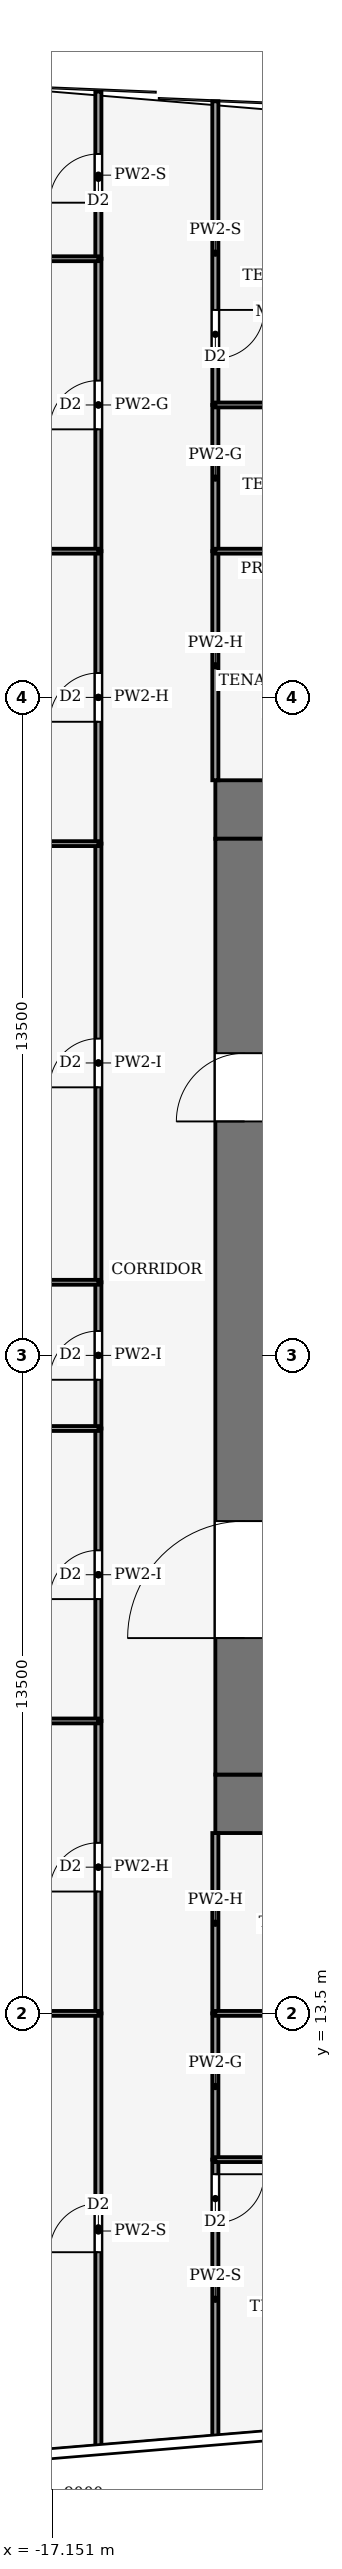
"""IFC4 building model, lengths in metres.
Left out: names, types, materials, properties, quantities, classifications, styles, units other than length and angle.
Written with IfcOpenShell. Run it as: python <this file> out.ifc"""

import sys

from ifc_helpers import new_model, si_unit, direction, frame, frame_2d, origin, place, context, subcontext, project, spatial, rectangle, extrude, element, fill, save


model = new_model("IFC4")
c1 = context("Model", 3, precision=1e-05, world=origin(), true_north=direction((0.0, 1.0)))
c2 = subcontext(c1, "Body", "Model", "MODEL_VIEW")
j1 = project(units=[si_unit("LENGTHUNIT", "METRE"), si_unit("PLANEANGLEUNIT", "RADIAN")], contexts=[c1])
p1 = place(None, origin())
s1 = spatial("IfcSite", under=j1, at=p1, CompositionType="ELEMENT")
p2 = place(p1, origin())
s2 = spatial("IfcBuilding", under=s1, at=p2, CompositionType="ELEMENT")
p3 = place(p2, frame((0.0, 0.0, 70.0)))
s3 = spatial("IfcBuildingStorey", under=s2, at=p3, CompositionType="ELEMENT", Elevation=70.0)
for number, where, z_axis, x_axis in (
    (1, (-13.8, 17.8, -0.13), (0.0, 0.0, 1.0), (1.0, 0.0, 0.0)),
    (2, (-13.8, 38.2, -0.13), (0.0, 0.0, 1.0), (1.0, 0.0, 0.0)),
):
    element("IfcWall", number, at=place(p3, frame(where, z_axis=z_axis, x_axis=x_axis)), inside=s3, PredefinedType="SHEAR", context=c2, shape_type="SweptSolid", body=[
        extrude(rectangle(XDim=27.6, YDim=1.2, at=frame_2d((13.8, 0.0))), origin(), (0.0, 0.0, 1.0), 4.0),
    ])
p4 = place(p3, frame((-13.2, 18.4, -0.13), z_axis=(0.0, 0.0, 1.0), x_axis=(0.0, 1.0, 0.0)))
e3 = element("IfcWall", 3, at=p4, inside=s3, PredefinedType="SHEAR", context=c2, shape_type="SweptSolid", body=[
    extrude(rectangle(XDim=19.2, YDim=1.2, at=frame_2d((9.6, 0.0))), origin(), (0.0, 0.0, 1.0), 4.0),
])
p5 = place(p4, frame((2.8, 0.0, 0.13)))
e4 = element("IfcOpeningElement", 4, at=p5, cuts=e3, PredefinedType="OPENING", context=c2, shape_type="SweptSolid", body=[
    extrude(rectangle(XDim=2.4, YDim=2.4, at=frame_2d((1.2, 1.2))), frame((0.0, 0.61, 0.0), z_axis=(0.0, -1.0, 0.0), x_axis=(1.0, 0.0, 0.0)), (0.0, 0.0, 1.0), 1.22),
])
p6 = place(p4, frame((13.4, 0.0, 0.13)))
e5 = element("IfcOpeningElement", 5, at=p6, cuts=e3, PredefinedType="OPENING", context=c2, shape_type="SweptSolid", body=[
    extrude(rectangle(XDim=1.4, YDim=2.2, at=frame_2d((0.7, 1.1))), frame((0.0, 0.61, 0.0), z_axis=(0.0, -1.0, 0.0), x_axis=(1.0, 0.0, 0.0)), (0.0, 0.0, 1.0), 1.22),
])
p7 = place(p3, frame((-16.2, 4.57, 0.0), z_axis=(0.0, 0.0, 1.0), x_axis=(0.0, 1.0, 0.0)))
e6 = element("IfcWall", 6, at=p7, inside=s3, PredefinedType="PARTITIONING", context=c2, shape_type="SweptSolid", body=[
    extrude(rectangle(XDim=8.93, YDim=0.125, at=frame_2d((4.465, 0.0))), origin(), (0.0, 0.0, 1.0), 3.04),
])
p8 = place(p7, frame((4.03, 0.0, 0.0)))
e7 = element("IfcOpeningElement", 7, at=p8, cuts=e6, PredefinedType="OPENING", context=c2, shape_type="SweptSolid", body=[
    extrude(rectangle(XDim=1.0, YDim=2.1, at=frame_2d((0.5, 1.05))), frame((0.0, 0.073, 0.0), z_axis=(0.0, -1.0, 0.0), x_axis=(1.0, 0.0, 0.0)), (0.0, 0.0, 1.0), 0.145),
])
p9 = place(p3, frame((-16.2, 13.5, 0.0), z_axis=(0.0, 0.0, 1.0), x_axis=(0.0, 1.0, 0.0)))
e8 = element("IfcWall", 8, at=p9, inside=s3, PredefinedType="PARTITIONING", context=c2, shape_type="SweptSolid", body=[
    extrude(rectangle(XDim=6.0, YDim=0.125, at=frame_2d((3.0, 0.0))), origin(), (0.0, 0.0, 1.0), 3.14),
])
p10 = place(p9, frame((2.5, 0.0, 0.0)))
e9 = element("IfcOpeningElement", 9, at=p10, cuts=e8, PredefinedType="OPENING", context=c2, shape_type="SweptSolid", body=[
    extrude(rectangle(XDim=1.0, YDim=2.1, at=frame_2d((0.5, 1.05))), frame((0.0, 0.073, 0.0), z_axis=(0.0, -1.0, 0.0), x_axis=(1.0, 0.0, 0.0)), (0.0, 0.0, 1.0), 0.145),
])
p11 = place(p3, frame((-16.2, 19.5, 0.0), z_axis=(0.0, 0.0, 1.0), x_axis=(0.0, 1.0, 0.0)))
e10 = element("IfcWall", 10, at=p11, inside=s3, PredefinedType="PARTITIONING", context=c2, shape_type="SweptSolid", body=[
    extrude(rectangle(XDim=6.0, YDim=0.125, at=frame_2d((3.0, 0.0))), origin(), (0.0, 0.0, 1.0), 3.48),
])
p12 = place(p11, frame((2.5, 0.0, 0.0)))
e11 = element("IfcOpeningElement", 11, at=p12, cuts=e10, PredefinedType="OPENING", context=c2, shape_type="SweptSolid", body=[
    extrude(rectangle(XDim=1.0, YDim=2.1, at=frame_2d((0.5, 1.05))), frame((0.0, 0.073, 0.0), z_axis=(0.0, -1.0, 0.0), x_axis=(1.0, 0.0, 0.0)), (0.0, 0.0, 1.0), 0.145),
])
p13 = place(p3, frame((-16.2, 25.5, 0.0), z_axis=(0.0, 0.0, 1.0), x_axis=(0.0, 1.0, 0.0)))
e12 = element("IfcWall", 12, at=p13, inside=s3, PredefinedType="PARTITIONING", context=c2, shape_type="SweptSolid", body=[
    extrude(rectangle(XDim=3.0, YDim=0.125, at=frame_2d((1.5, 0.0))), origin(), (0.0, 0.0, 1.0), 3.48),
])
p14 = place(p13, frame((1.0, 0.0, 0.0)))
e13 = element("IfcOpeningElement", 13, at=p14, cuts=e12, PredefinedType="OPENING", context=c2, shape_type="SweptSolid", body=[
    extrude(rectangle(XDim=1.0, YDim=2.1, at=frame_2d((0.5, 1.05))), frame((0.0, 0.073, 0.0), z_axis=(0.0, -1.0, 0.0), x_axis=(1.0, 0.0, 0.0)), (0.0, 0.0, 1.0), 0.145),
])
p15 = place(p3, frame((-16.2, 28.5, 0.0), z_axis=(0.0, 0.0, 1.0), x_axis=(0.0, 1.0, 0.0)))
e14 = element("IfcWall", 14, at=p15, inside=s3, PredefinedType="PARTITIONING", context=c2, shape_type="SweptSolid", body=[
    extrude(rectangle(XDim=9.0, YDim=0.125, at=frame_2d((4.5, 0.0))), origin(), (0.0, 0.0, 1.0), 3.48),
])
p16 = place(p15, frame((4.0, 0.0, 0.0)))
e15 = element("IfcOpeningElement", 15, at=p16, cuts=e14, PredefinedType="OPENING", context=c2, shape_type="SweptSolid", body=[
    extrude(rectangle(XDim=1.0, YDim=2.1, at=frame_2d((0.5, 1.05))), frame((0.0, 0.073, 0.0), z_axis=(0.0, -1.0, 0.0), x_axis=(1.0, 0.0, 0.0)), (0.0, 0.0, 1.0), 0.145),
])
p17 = place(p3, frame((-16.2, 37.5, 0.0), z_axis=(0.0, 0.0, 1.0), x_axis=(0.0, 1.0, 0.0)))
e16 = element("IfcWall", 16, at=p17, inside=s3, PredefinedType="PARTITIONING", context=c2, shape_type="SweptSolid", body=[
    extrude(rectangle(XDim=6.0, YDim=0.125, at=frame_2d((3.0, 0.0))), origin(), (0.0, 0.0, 1.0), 3.14),
])
p18 = place(p17, frame((2.5, 0.0, 0.0)))
e17 = element("IfcOpeningElement", 17, at=p18, cuts=e16, PredefinedType="OPENING", context=c2, shape_type="SweptSolid", body=[
    extrude(rectangle(XDim=1.0, YDim=2.1, at=frame_2d((0.5, 1.05))), frame((0.0, 0.073, 0.0), z_axis=(0.0, -1.0, 0.0), x_axis=(1.0, 0.0, 0.0)), (0.0, 0.0, 1.0), 0.145),
])
p19 = place(p3, frame((-16.2, 43.5, 0.0), z_axis=(0.0, 0.0, 1.0), x_axis=(0.0, 1.0, 0.0)))
e18 = element("IfcWall", 18, at=p19, inside=s3, PredefinedType="PARTITIONING", context=c2, shape_type="SweptSolid", body=[
    extrude(rectangle(XDim=6.0, YDim=0.125, at=frame_2d((3.0, 0.0))), origin(), (0.0, 0.0, 1.0), 3.87),
])
p20 = place(p19, frame((2.5, 0.0, 0.0)))
e19 = element("IfcOpeningElement", 19, at=p20, cuts=e18, PredefinedType="OPENING", context=c2, shape_type="SweptSolid", body=[
    extrude(rectangle(XDim=1.0, YDim=2.1, at=frame_2d((0.5, 1.05))), frame((0.0, 0.073, 0.0), z_axis=(0.0, -1.0, 0.0), x_axis=(1.0, 0.0, 0.0)), (0.0, 0.0, 1.0), 0.145),
])
p21 = place(p3, frame((-16.2, 49.5, 0.0), z_axis=(0.0, 0.0, 1.0), x_axis=(0.0, 1.0, 0.0)))
e20 = element("IfcWall", 20, at=p21, inside=s3, PredefinedType="PARTITIONING", context=c2, shape_type="SweptSolid", body=[
    extrude(rectangle(XDim=3.43, YDim=0.125, at=frame_2d((1.715, 0.0))), origin(), (0.0, 0.0, 1.0), 3.04),
])
p22 = place(p21, frame((1.15, 0.0, 0.0)))
e21 = element("IfcOpeningElement", 21, at=p22, cuts=e20, PredefinedType="OPENING", context=c2, shape_type="SweptSolid", body=[
    extrude(rectangle(XDim=1.0, YDim=2.1, at=frame_2d((0.5, 1.05))), frame((0.0, 0.073, 0.0), z_axis=(0.0, -1.0, 0.0), x_axis=(1.0, 0.0, 0.0)), (0.0, 0.0, 1.0), 0.145),
])
p23 = place(p3, frame((-13.8, 10.5, 0.0), z_axis=(0.0, 0.0, 1.0), x_axis=(0.0, -1.0, 0.0)))
e22 = element("IfcWall", 22, at=p23, inside=s3, PredefinedType="PARTITIONING", context=c2, shape_type="SweptSolid", body=[
    extrude(rectangle(XDim=5.73, YDim=0.125, at=frame_2d((2.865, 0.0))), origin(), (0.0, 0.0, 1.0), 3.04),
])
p24 = place(p23, frame((0.3, 0.0, 0.0)))
e23 = element("IfcOpeningElement", 23, at=p24, cuts=e22, PredefinedType="OPENING", context=c2, shape_type="SweptSolid", body=[
    extrude(rectangle(XDim=1.0, YDim=2.1, at=frame_2d((0.5, 1.05))), frame((0.0, 0.073, 0.0), z_axis=(0.0, -1.0, 0.0), x_axis=(1.0, 0.0, 0.0)), (0.0, 0.0, 1.0), 0.145),
])
p25 = place(p3, frame((-13.8, 10.5, 0.0), z_axis=(0.0, 0.0, 1.0), x_axis=(0.0, 1.0, 0.0)))
e24 = element("IfcWall", 24, at=p25, inside=s3, PredefinedType="PARTITIONING", context=c2, shape_type="SweptSolid", body=[
    extrude(rectangle(XDim=3.0, YDim=0.125, at=frame_2d((1.5, 0.0))), origin(), (0.0, 0.0, 1.0), 3.87),
])
p26 = place(p3, frame((-13.8, 13.5, 0.0), z_axis=(0.0, 0.0, 1.0), x_axis=(0.0, 1.0, 0.0)))
e25 = element("IfcWall", 25, at=p26, inside=s3, PredefinedType="PARTITIONING", context=c2, shape_type="SweptSolid", body=[
    extrude(rectangle(XDim=3.7, YDim=0.125, at=frame_2d((1.85, 0.0))), origin(), (0.0, 0.0, 1.0), 3.14),
])
p27 = place(p3, frame((-13.8, 38.8, 0.0), z_axis=(0.0, 0.0, 1.0), x_axis=(0.0, 1.0, 0.0)))
e26 = element("IfcWall", 26, at=p27, inside=s3, PredefinedType="PARTITIONING", context=c2, shape_type="SweptSolid", body=[
    extrude(rectangle(XDim=4.7, YDim=0.125, at=frame_2d((2.35, 0.0))), origin(), (0.0, 0.0, 1.0), 3.14),
])
p28 = place(p3, frame((-13.8, 43.5, 0.0), z_axis=(0.0, 0.0, 1.0), x_axis=(0.0, 1.0, 0.0)))
e27 = element("IfcWall", 27, at=p28, inside=s3, PredefinedType="PARTITIONING", context=c2, shape_type="SweptSolid", body=[
    extrude(rectangle(XDim=3.0, YDim=0.125, at=frame_2d((1.5, 0.0))), origin(), (0.0, 0.0, 1.0), 3.87),
])
p29 = place(p3, frame((-13.8, 52.73, 0.0), z_axis=(0.0, 0.0, 1.0), x_axis=(0.0, -1.0, 0.0)))
e28 = element("IfcWall", 28, at=p29, inside=s3, PredefinedType="PARTITIONING", context=c2, shape_type="SweptSolid", body=[
    extrude(rectangle(XDim=6.23, YDim=0.125, at=frame_2d((3.115, 0.0))), origin(), (0.0, 0.0, 1.0), 3.04),
])
p30 = place(p29, frame((4.28, 0.0, 0.0)))
e29 = element("IfcOpeningElement", 29, at=p30, cuts=e28, PredefinedType="OPENING", context=c2, shape_type="SweptSolid", body=[
    extrude(rectangle(XDim=1.0, YDim=2.1, at=frame_2d((0.5, 1.05))), frame((0.0, 0.073, 0.0), z_axis=(0.0, -1.0, 0.0), x_axis=(1.0, 0.0, 0.0)), (0.0, 0.0, 1.0), 0.145),
])
p31 = place(p3, frame((-16.2, 13.5, 0.0), z_axis=(0.0, 0.0, 1.0), x_axis=(-1.0, 0.0, 0.0)))
e30 = element("IfcWall", 30, at=p31, inside=s3, PredefinedType="PARTITIONING", context=c2, shape_type="SweptSolid", body=[
    extrude(rectangle(XDim=7.634, YDim=0.1, at=frame_2d((3.817, 0.0))), origin(), (0.0, 0.0, 1.0), 3.04),
])
p32 = place(p3, frame((-16.2, 19.5, 0.0), z_axis=(0.0, 0.0, 1.0), x_axis=(-1.0, 0.0, 0.0)))
e31 = element("IfcWall", 31, at=p32, inside=s3, PredefinedType="PARTITIONING", context=c2, shape_type="SweptSolid", body=[
    extrude(rectangle(XDim=7.14, YDim=0.1, at=frame_2d((3.57, 0.0))), origin(), (0.0, 0.0, 1.0), 3.04),
])
p33 = place(p3, frame((-16.2, 25.5, 0.0), z_axis=(0.0, 0.0, 1.0), x_axis=(-1.0, 0.0, 0.0)))
e32 = element("IfcWall", 32, at=p33, inside=s3, PredefinedType="PARTITIONING", context=c2, shape_type="SweptSolid", body=[
    extrude(rectangle(XDim=6.647, YDim=0.1, at=frame_2d((3.324, 0.0))), origin(), (0.0, 0.0, 1.0), 3.04),
])
p34 = place(p3, frame((-16.2, 28.5, 0.0), z_axis=(0.0, 0.0, 1.0), x_axis=(-1.0, 0.0, 0.0)))
e33 = element("IfcWall", 33, at=p34, inside=s3, PredefinedType="PARTITIONING", context=c2, shape_type="SweptSolid", body=[
    extrude(rectangle(XDim=6.401, YDim=0.1, at=frame_2d((3.2, 0.0))), origin(), (0.0, 0.0, 1.0), 3.04),
])
p35 = place(p3, frame((-16.2, 37.5, 0.0), z_axis=(0.0, 0.0, 1.0), x_axis=(-1.0, 0.0, 0.0)))
e34 = element("IfcWall", 34, at=p35, inside=s3, PredefinedType="PARTITIONING", context=c2, shape_type="SweptSolid", body=[
    extrude(rectangle(XDim=7.099, YDim=0.1, at=frame_2d((3.55, 0.0))), origin(), (0.0, 0.0, 1.0), 3.04),
])
p36 = place(p3, frame((-16.2, 43.5, 0.0), z_axis=(0.0, 0.0, 1.0), x_axis=(-1.0, 0.0, 0.0)))
e35 = element("IfcWall", 35, at=p36, inside=s3, PredefinedType="PARTITIONING", context=c2, shape_type="SweptSolid", body=[
    extrude(rectangle(XDim=7.592, YDim=0.1, at=frame_2d((3.796, 0.0))), origin(), (0.0, 0.0, 1.0), 3.04),
])
p37 = place(p3, frame((-16.2, 49.5, 0.0), z_axis=(0.0, 0.0, 1.0), x_axis=(-1.0, 0.0, 0.0)))
e36 = element("IfcWall", 36, at=p37, inside=s3, PredefinedType="PARTITIONING", context=c2, shape_type="SweptSolid", body=[
    extrude(rectangle(XDim=7.287, YDim=0.1, at=frame_2d((3.644, 0.0))), origin(), (0.0, 0.0, 1.0), 3.34),
])
p38 = place(p3, frame((-13.8, 10.5, 0.0), z_axis=(0.0, 0.0, 1.0), x_axis=(1.0, 0.0, 0.0)))
e37 = element("IfcWall", 37, at=p38, inside=s3, PredefinedType="PARTITIONING", context=c2, shape_type="SweptSolid", body=[
    extrude(rectangle(XDim=6.3, YDim=0.1, at=frame_2d((3.15, 0.0))), origin(), (0.0, 0.0, 1.0), 3.39),
])
p39 = place(p38, frame((2.65, 0.0, 0.0)))
e38 = element("IfcOpeningElement", 38, at=p39, cuts=e37, PredefinedType="OPENING", context=c2, shape_type="SweptSolid", body=[
    extrude(rectangle(XDim=1.0, YDim=2.1, at=frame_2d((0.5, 1.05))), frame((0.0, 0.06, 0.0), z_axis=(0.0, -1.0, 0.0), x_axis=(1.0, 0.0, 0.0)), (0.0, 0.0, 1.0), 0.12),
])
p40 = place(p3, frame((-13.8, 13.5, 0.0), z_axis=(0.0, 0.0, 1.0), x_axis=(1.0, 0.0, 0.0)))
e39 = element("IfcWall", 39, at=p40, inside=s3, PredefinedType="PARTITIONING", context=c2, shape_type="SweptSolid", body=[
    extrude(rectangle(XDim=6.3, YDim=0.1, at=frame_2d((3.15, 0.0))), origin(), (0.0, 0.0, 1.0), 3.39),
])
p41 = place(p40, frame((2.65, 0.0, 0.0)))
e40 = element("IfcOpeningElement", 40, at=p41, cuts=e39, PredefinedType="OPENING", context=c2, shape_type="SweptSolid", body=[
    extrude(rectangle(XDim=1.0, YDim=2.1, at=frame_2d((0.5, 1.05))), frame((0.0, 0.06, 0.0), z_axis=(0.0, -1.0, 0.0), x_axis=(1.0, 0.0, 0.0)), (0.0, 0.0, 1.0), 0.12),
])
p42 = place(p3, frame((-10.5, 43.5, 0.0), z_axis=(0.0, 0.0, 1.0), x_axis=(-1.0, 0.0, 0.0)))
e41 = element("IfcWall", 41, at=p42, inside=s3, PredefinedType="PARTITIONING", context=c2, shape_type="SweptSolid", body=[
    extrude(rectangle(XDim=3.3, YDim=0.1, at=frame_2d((1.65, 0.0))), origin(), (0.0, 0.0, 1.0), 3.39),
])
p43 = place(p3, frame((-10.5, 46.5, 0.0), z_axis=(0.0, 0.0, 1.0), x_axis=(-1.0, 0.0, 0.0)))
e42 = element("IfcWall", 42, at=p43, inside=s3, PredefinedType="PARTITIONING", context=c2, shape_type="SweptSolid", body=[
    extrude(rectangle(XDim=3.3, YDim=0.1, at=frame_2d((1.65, 0.0))), origin(), (0.0, 0.0, 1.0), 3.39),
])
p44 = place(p43, frame((0.35, 0.0, 0.0)))
e43 = element("IfcOpeningElement", 43, at=p44, cuts=e42, PredefinedType="OPENING", context=c2, shape_type="SweptSolid", body=[
    extrude(rectangle(XDim=1.0, YDim=2.1, at=frame_2d((0.5, 1.05))), frame((0.0, 0.06, 0.0), z_axis=(0.0, -1.0, 0.0), x_axis=(1.0, 0.0, 0.0)), (0.0, 0.0, 1.0), 0.12),
])
p45 = place(p5, origin())
e44 = element("IfcDoor", 44, at=p45, inside=s3, OperationType="DOUBLE_DOOR_SINGLE_SWING", PredefinedType="DOOR", context=c2, shape_type="SweptSolid", body=[
    extrude(rectangle(XDim=2.4, YDim=2.4, at=frame_2d((1.2, 1.2))), frame((0.0, 0.025, 0.0), z_axis=(0.0, -1.0, 0.0), x_axis=(1.0, 0.0, 0.0)), (0.0, 0.0, 1.0), 0.05),
])
fill(e4, e44)
p46 = place(p6, origin())
e45 = element("IfcDoor", 45, at=p46, inside=s3, OperationType="SINGLE_SWING_LEFT", PredefinedType="DOOR", context=c2, shape_type="SweptSolid", body=[
    extrude(rectangle(XDim=1.4, YDim=2.2, at=frame_2d((0.7, 1.1))), frame((0.0, 0.025, 0.0), z_axis=(0.0, -1.0, 0.0), x_axis=(1.0, 0.0, 0.0)), (0.0, 0.0, 1.0), 0.05),
])
fill(e5, e45)
p47 = place(p8, origin())
e46 = element("IfcDoor", 46, at=p47, inside=s3, OperationType="SINGLE_SWING_RIGHT", PredefinedType="DOOR", context=c2, shape_type="SweptSolid", body=[
    extrude(rectangle(XDim=1.0, YDim=2.1, at=frame_2d((0.5, 1.05))), frame((0.0, 0.025, 0.0), z_axis=(0.0, -1.0, 0.0), x_axis=(1.0, 0.0, 0.0)), (0.0, 0.0, 1.0), 0.05),
])
fill(e7, e46)
p48 = place(p10, origin())
e47 = element("IfcDoor", 47, at=p48, inside=s3, OperationType="SINGLE_SWING_RIGHT", PredefinedType="DOOR", context=c2, shape_type="SweptSolid", body=[
    extrude(rectangle(XDim=1.0, YDim=2.1, at=frame_2d((0.5, 1.05))), frame((0.0, 0.025, 0.0), z_axis=(0.0, -1.0, 0.0), x_axis=(1.0, 0.0, 0.0)), (0.0, 0.0, 1.0), 0.05),
])
fill(e9, e47)
p49 = place(p12, origin())
e48 = element("IfcDoor", 48, at=p49, inside=s3, OperationType="SINGLE_SWING_LEFT", PredefinedType="DOOR", context=c2, shape_type="SweptSolid", body=[
    extrude(rectangle(XDim=1.0, YDim=2.1, at=frame_2d((0.5, 1.05))), frame((0.0, 0.025, 0.0), z_axis=(0.0, -1.0, 0.0), x_axis=(1.0, 0.0, 0.0)), (0.0, 0.0, 1.0), 0.05),
])
fill(e11, e48)
p50 = place(p14, origin())
e49 = element("IfcDoor", 49, at=p50, inside=s3, OperationType="SINGLE_SWING_RIGHT", PredefinedType="DOOR", context=c2, shape_type="SweptSolid", body=[
    extrude(rectangle(XDim=1.0, YDim=2.1, at=frame_2d((0.5, 1.05))), frame((0.0, 0.025, 0.0), z_axis=(0.0, -1.0, 0.0), x_axis=(1.0, 0.0, 0.0)), (0.0, 0.0, 1.0), 0.05),
])
fill(e13, e49)
p51 = place(p16, origin())
e50 = element("IfcDoor", 50, at=p51, inside=s3, OperationType="SINGLE_SWING_LEFT", PredefinedType="DOOR", context=c2, shape_type="SweptSolid", body=[
    extrude(rectangle(XDim=1.0, YDim=2.1, at=frame_2d((0.5, 1.05))), frame((0.0, 0.025, 0.0), z_axis=(0.0, -1.0, 0.0), x_axis=(1.0, 0.0, 0.0)), (0.0, 0.0, 1.0), 0.05),
])
fill(e15, e50)
p52 = place(p18, origin())
e51 = element("IfcDoor", 51, at=p52, inside=s3, OperationType="SINGLE_SWING_RIGHT", PredefinedType="DOOR", context=c2, shape_type="SweptSolid", body=[
    extrude(rectangle(XDim=1.0, YDim=2.1, at=frame_2d((0.5, 1.05))), frame((0.0, 0.025, 0.0), z_axis=(0.0, -1.0, 0.0), x_axis=(1.0, 0.0, 0.0)), (0.0, 0.0, 1.0), 0.05),
])
fill(e17, e51)
p53 = place(p20, origin())
e52 = element("IfcDoor", 52, at=p53, inside=s3, OperationType="SINGLE_SWING_LEFT", PredefinedType="DOOR", context=c2, shape_type="SweptSolid", body=[
    extrude(rectangle(XDim=1.0, YDim=2.1, at=frame_2d((0.5, 1.05))), frame((0.0, 0.025, 0.0), z_axis=(0.0, -1.0, 0.0), x_axis=(1.0, 0.0, 0.0)), (0.0, 0.0, 1.0), 0.05),
])
fill(e19, e52)
p54 = place(p22, origin())
e53 = element("IfcDoor", 53, at=p54, inside=s3, OperationType="SINGLE_SWING_LEFT", PredefinedType="DOOR", context=c2, shape_type="SweptSolid", body=[
    extrude(rectangle(XDim=1.0, YDim=2.1, at=frame_2d((0.5, 1.05))), frame((0.0, 0.025, 0.0), z_axis=(0.0, -1.0, 0.0), x_axis=(1.0, 0.0, 0.0)), (0.0, 0.0, 1.0), 0.05),
])
fill(e21, e53)
p55 = place(p24, origin())
e54 = element("IfcDoor", 54, at=p55, inside=s3, OperationType="SINGLE_SWING_LEFT", PredefinedType="DOOR", context=c2, shape_type="SweptSolid", body=[
    extrude(rectangle(XDim=1.0, YDim=2.1, at=frame_2d((0.5, 1.05))), frame((0.0, 0.025, 0.0), z_axis=(0.0, -1.0, 0.0), x_axis=(1.0, 0.0, 0.0)), (0.0, 0.0, 1.0), 0.05),
])
fill(e23, e54)
p56 = place(p30, origin())
e55 = element("IfcDoor", 55, at=p56, inside=s3, OperationType="SINGLE_SWING_RIGHT", PredefinedType="DOOR", context=c2, shape_type="SweptSolid", body=[
    extrude(rectangle(XDim=1.0, YDim=2.1, at=frame_2d((0.5, 1.05))), frame((0.0, 0.025, 0.0), z_axis=(0.0, -1.0, 0.0), x_axis=(1.0, 0.0, 0.0)), (0.0, 0.0, 1.0), 0.05),
])
fill(e29, e55)
save(model, sys.argv[1])
